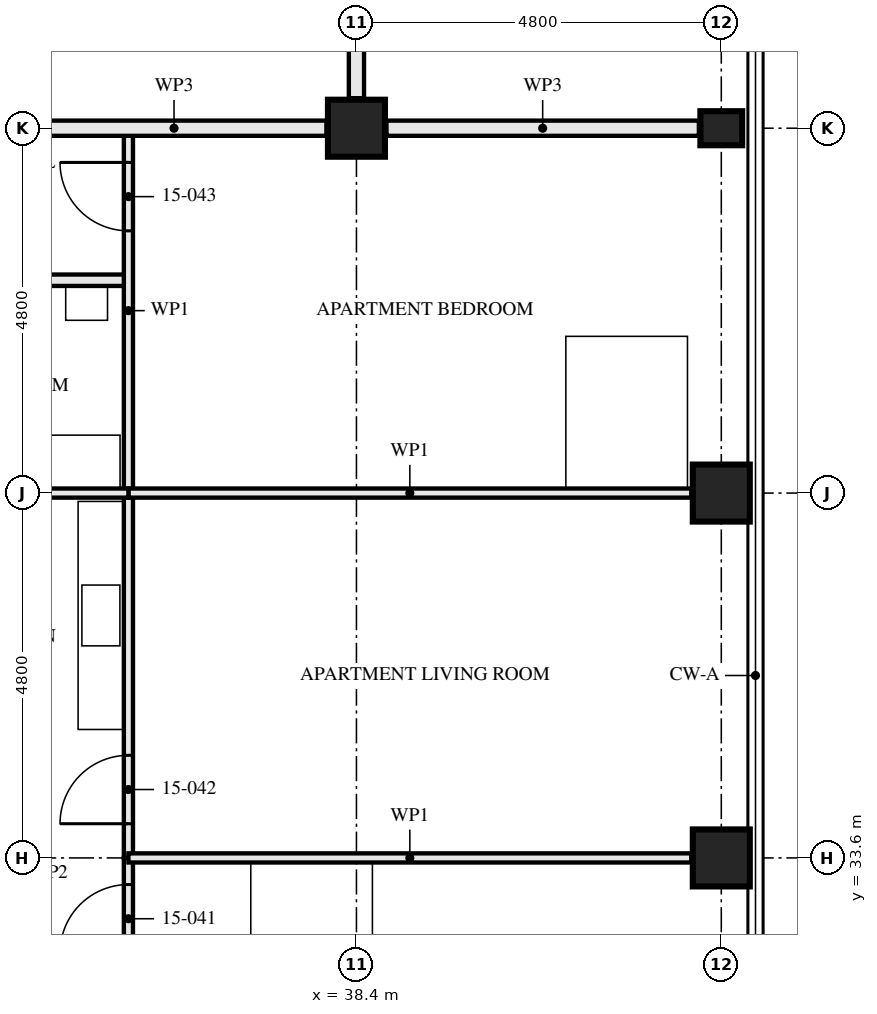
"""IFC4 building model, lengths in metres.
Left out: names, types, materials, properties, quantities, classifications, styles, units other than length and angle.
Written with IfcOpenShell. Run it as: python <this file> out.ifc"""

import sys

from ifc_helpers import new_model, si_unit, direction, frame, frame_2d, origin, origin_2d, place, context, subcontext, project, spatial, rectangle, hollow_rectangle, i_section, extrude, element, fill, save


model = new_model("IFC4")
c1 = context("Model", 3, precision=1e-05, world=origin(), true_north=direction((0.0, 1.0)))
c2 = subcontext(c1, "Body", "Model", "MODEL_VIEW")
j1 = project(units=[si_unit("LENGTHUNIT", "METRE"), si_unit("PLANEANGLEUNIT", "RADIAN")], contexts=[c1])
p1 = place(None, origin())
s1 = spatial("IfcSite", under=j1, at=p1, CompositionType="ELEMENT")
p2 = place(p1, origin())
s2 = spatial("IfcBuilding", under=s1, at=p2, CompositionType="ELEMENT")
p3 = place(p2, frame((0.0, 0.0, 58.5)))
s3 = spatial("IfcBuildingStorey", under=s2, at=p3, CompositionType="ELEMENT", Elevation=58.5)
for number, where, z_axis, x_axis in (
    (1, (38.4, 43.2, 0.0), (0.0, 0.0, 1.0), (0.0, 1.0, 0.0)),
    (2, (43.2, 33.6, 0.0), (0.0, 0.0, 1.0), (1.0, 0.0, 0.0)),
    (3, (43.2, 38.4, 0.0), (0.0, 0.0, 1.0), (1.0, 0.0, 0.0)),
):
    element("IfcColumn", number, at=place(p3, frame(where, z_axis=z_axis, x_axis=x_axis)), inside=s3, PredefinedType="COLUMN", context=c2, shape_type="SweptSolid", body=[
        extrude(hollow_rectangle(XDim=0.75, YDim=0.75, WallThickness=0.08, at=origin_2d()), origin(), (0.0, 0.0, 1.0), 3.5),
    ])
p4 = place(p3, frame((43.2, 43.2, 0.0), z_axis=(0.0, 0.0, 1.0), x_axis=(0.0, 1.0, 0.0)))
e4 = element("IfcColumn", 4, at=p4, inside=s3, PredefinedType="COLUMN", context=c2, shape_type="SweptSolid", body=[
    extrude(i_section(OverallWidth=0.448, OverallDepth=0.55, WebThickness=0.072, FlangeThickness=0.115, FilletRadius=0.015, at=origin_2d()), origin(), (0.0, 0.0, 1.0), 3.5),
])
p5 = place(p3, frame((35.4, 41.2, 0.0), z_axis=(0.0, 0.0, 1.0), x_axis=(-1.0, 0.0, 0.0)))
e5 = element("IfcWall", 5, at=p5, inside=s3, PredefinedType="PARTITIONING", context=c2, shape_type="SweptSolid", body=[
    extrude(rectangle(XDim=3.0, YDim=0.15, at=frame_2d((1.5, 0.0))), origin(), (0.0, 0.0, 1.0), 3.33),
])
p6 = place(p5, frame((1.05, 0.0, 0.0)))
e6 = element("IfcOpeningElement", 6, at=p6, cuts=e5, PredefinedType="OPENING", context=c2, shape_type="SweptSolid", body=[
    extrude(rectangle(XDim=0.9, YDim=2.1, at=frame_2d((0.45, 1.05))), frame((0.0, 0.085, 0.0), z_axis=(0.0, -1.0, 0.0), x_axis=(1.0, 0.0, 0.0)), (0.0, 0.0, 1.0), 0.171),
])
p7 = place(p3, frame((35.4, 38.4, 0.0), z_axis=(0.0, 0.0, 1.0), x_axis=(-1.0, 0.0, 0.0)))
e7 = element("IfcWall", 7, at=p7, inside=s3, PredefinedType="PARTITIONING", context=c2, shape_type="SweptSolid", body=[
    extrude(rectangle(XDim=4.65, YDim=0.12, at=frame_2d((2.325, 0.0))), origin(), (0.0, 0.0, 1.0), 2.55),
])
p8 = place(p7, frame((3.35, 0.0, 0.0)))
e8 = element("IfcOpeningElement", 8, at=p8, cuts=e7, PredefinedType="OPENING", context=c2, shape_type="SweptSolid", body=[
    extrude(rectangle(XDim=0.9, YDim=2.1, at=frame_2d((0.45, 1.05))), frame((0.0, 0.071, 0.0), z_axis=(0.0, -1.0, 0.0), x_axis=(1.0, 0.0, 0.0)), (0.0, 0.0, 1.0), 0.141),
])
p9 = place(p3, frame((35.4, 32.2, 0.0), z_axis=(0.0, 0.0, 1.0), x_axis=(0.0, 1.0, 0.0)))
e9 = element("IfcWall", 9, at=p9, inside=s3, PredefinedType="PARTITIONING", context=c2, shape_type="SweptSolid", body=[
    extrude(rectangle(XDim=1.4, YDim=0.12, at=frame_2d((0.7, 0.0))), origin(), (0.0, 0.0, 1.0), 3.33),
])
p10 = place(p9, frame((0.15, 0.0, 0.0)))
e10 = element("IfcOpeningElement", 10, at=p10, cuts=e9, PredefinedType="OPENING", context=c2, shape_type="SweptSolid", body=[
    extrude(rectangle(XDim=0.9, YDim=2.1, at=frame_2d((0.45, 1.05))), frame((0.0, 0.071, 0.0), z_axis=(0.0, -1.0, 0.0), x_axis=(1.0, 0.0, 0.0)), (0.0, 0.0, 1.0), 0.141),
])
p11 = place(p3, frame((35.4, 33.6, 0.0), z_axis=(0.0, 0.0, 1.0), x_axis=(0.0, 1.0, 0.0)))
e11 = element("IfcWall", 11, at=p11, inside=s3, PredefinedType="PARTITIONING", context=c2, shape_type="SweptSolid", body=[
    extrude(rectangle(XDim=4.8, YDim=0.12, at=frame_2d((2.4, 0.0))), origin(), (0.0, 0.0, 1.0), 3.33),
])
p12 = place(p11, frame((0.45, 0.0, 0.0)))
e12 = element("IfcOpeningElement", 12, at=p12, cuts=e11, PredefinedType="OPENING", context=c2, shape_type="SweptSolid", body=[
    extrude(rectangle(XDim=0.9, YDim=2.1, at=frame_2d((0.45, 1.05))), frame((0.0, 0.071, 0.0), z_axis=(0.0, -1.0, 0.0), x_axis=(1.0, 0.0, 0.0)), (0.0, 0.0, 1.0), 0.141),
])
p13 = place(p3, frame((35.4, 38.4, 0.0), z_axis=(0.0, 0.0, 1.0), x_axis=(0.0, 1.0, 0.0)))
e13 = element("IfcWall", 13, at=p13, inside=s3, PredefinedType="PARTITIONING", context=c2, shape_type="SweptSolid", body=[
    extrude(rectangle(XDim=4.8, YDim=0.12, at=frame_2d((2.4, 0.0))), origin(), (0.0, 0.0, 1.0), 3.33),
])
p14 = place(p13, frame((3.45, 0.0, 0.0)))
e14 = element("IfcOpeningElement", 14, at=p14, cuts=e13, PredefinedType="OPENING", context=c2, shape_type="SweptSolid", body=[
    extrude(rectangle(XDim=0.9, YDim=2.1, at=frame_2d((0.45, 1.05))), frame((0.0, 0.071, 0.0), z_axis=(0.0, -1.0, 0.0), x_axis=(1.0, 0.0, 0.0)), (0.0, 0.0, 1.0), 0.141),
])
for number, where, z_axis, x_axis in (
    (15, (42.805, 33.6, 0.0), (0.0, 0.0, 1.0), (-1.0, 0.0, 0.0)),
    (16, (42.805, 38.4, 0.0), (0.0, 0.0, 1.0), (-1.0, 0.0, 0.0)),
):
    element("IfcWall", number, at=place(p3, frame(where, z_axis=z_axis, x_axis=x_axis)), inside=s3, PredefinedType="PARTITIONING", context=c2, shape_type="SweptSolid", body=[
        extrude(rectangle(XDim=7.405, YDim=0.12, at=frame_2d((3.703, 0.0))), origin(), (0.0, 0.0, 1.0), 2.55),
    ])
p15 = place(p3, frame((38.4, 45.2, 0.0), z_axis=(0.0, 0.0, 1.0), x_axis=(0.0, -1.0, 0.0)))
e17 = element("IfcWall", 17, at=p15, inside=s3, PredefinedType="PARTITIONING", context=c2, shape_type="SweptSolid", body=[
    extrude(rectangle(XDim=1.605, YDim=0.2, at=frame_2d((0.802, 0.0))), origin(), (0.0, 0.0, 1.0), 3.33),
])
p16 = place(p3, frame((42.905, 43.2, 0.0), z_axis=(0.0, 0.0, 1.0), x_axis=(-1.0, 0.0, 0.0)))
e18 = element("IfcWall", 18, at=p16, inside=s3, PredefinedType="PARTITIONING", context=c2, shape_type="SweptSolid", body=[
    extrude(rectangle(XDim=4.11, YDim=0.2, at=frame_2d((2.055, 0.0))), origin(), (0.0, 0.0, 1.0), 2.32),
])
p17 = place(p3, frame((38.005, 43.2, 0.0), z_axis=(0.0, 0.0, 1.0), x_axis=(-1.0, 0.0, 0.0)))
e19 = element("IfcWall", 19, at=p17, inside=s3, PredefinedType="PARTITIONING", context=c2, shape_type="SweptSolid", body=[
    extrude(rectangle(XDim=4.01, YDim=0.2, at=frame_2d((2.005, 0.0))), origin(), (0.0, 0.0, 1.0), 2.32),
])
p18 = place(p10, origin())
e20 = element("IfcDoor", 20, at=p18, inside=s3, OperationType="SINGLE_SWING_RIGHT", PredefinedType="DOOR", context=c2, shape_type="SweptSolid", body=[
    extrude(rectangle(XDim=0.9, YDim=2.1, at=frame_2d((0.45, 1.05))), frame((0.0, 0.022, 0.0), z_axis=(0.0, -1.0, 0.0), x_axis=(1.0, 0.0, 0.0)), (0.0, 0.0, 1.0), 0.044),
])
fill(e10, e20)
p19 = place(p12, origin())
e21 = element("IfcDoor", 21, at=p19, inside=s3, OperationType="SINGLE_SWING_RIGHT", PredefinedType="DOOR", context=c2, shape_type="SweptSolid", body=[
    extrude(rectangle(XDim=0.9, YDim=2.1, at=frame_2d((0.45, 1.05))), frame((0.0, 0.022, 0.0), z_axis=(0.0, -1.0, 0.0), x_axis=(1.0, 0.0, 0.0)), (0.0, 0.0, 1.0), 0.044),
])
fill(e12, e21)
p20 = place(p14, origin())
e22 = element("IfcDoor", 22, at=p20, inside=s3, OperationType="SINGLE_SWING_LEFT", PredefinedType="DOOR", context=c2, shape_type="SweptSolid", body=[
    extrude(rectangle(XDim=0.9, YDim=2.1, at=frame_2d((0.45, 1.05))), frame((0.0, 0.022, 0.0), z_axis=(0.0, -1.0, 0.0), x_axis=(1.0, 0.0, 0.0)), (0.0, 0.0, 1.0), 0.044),
])
fill(e14, e22)
save(model, sys.argv[1])
